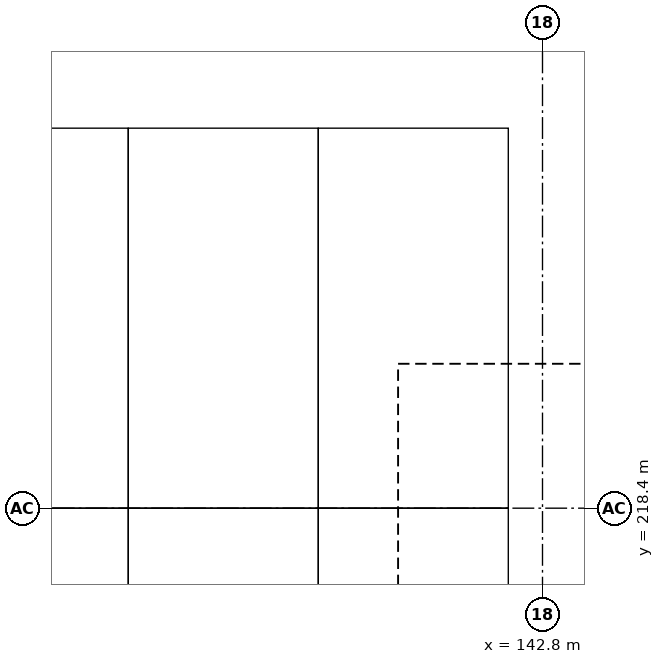
"""IFC4 building model, lengths in metres.
Left out: names, types, materials, properties, quantities, classifications, styles, units other than length and angle.
Written with IfcOpenShell. Run it as: python <this file> out.ifc"""

import sys

from ifc_helpers import new_model, si_unit, direction, frame, origin, origin_2d, place, context, subcontext, project, spatial, rectangle, extrude, element, save


model = new_model("IFC4")
c1 = context("Model", 3, precision=1e-05, world=origin(), true_north=direction((0.0, 1.0)))
c2 = subcontext(c1, "Body", "Model", "MODEL_VIEW")
j1 = project(units=[si_unit("LENGTHUNIT", "METRE"), si_unit("PLANEANGLEUNIT", "RADIAN")], contexts=[c1])
p1 = place(None, origin())
s1 = spatial("IfcSite", under=j1, at=p1, CompositionType="ELEMENT")
p2 = place(p1, origin())
s2 = spatial("IfcBuilding", under=s1, at=p2, CompositionType="ELEMENT")
p3 = place(p2, frame((0.0, 0.0, -3.0)))
s3 = spatial("IfcBuildingStorey", under=s2, at=p3, CompositionType="ELEMENT", Elevation=-3.0)
p4 = place(p3, frame((142.8, 218.4, 0.0), z_axis=(0.0, 0.0, 1.0), x_axis=(1.0, 0.0, 0.0)))
e1 = element("IfcColumn", 1, at=p4, inside=s3, PredefinedType="COLUMN", context=c2, shape_type="SweptSolid", body=[
    extrude(rectangle(XDim=0.8, YDim=0.8, at=origin_2d()), origin(), (0.0, 0.0, 1.0), 2.4),
])
save(model, sys.argv[1])
